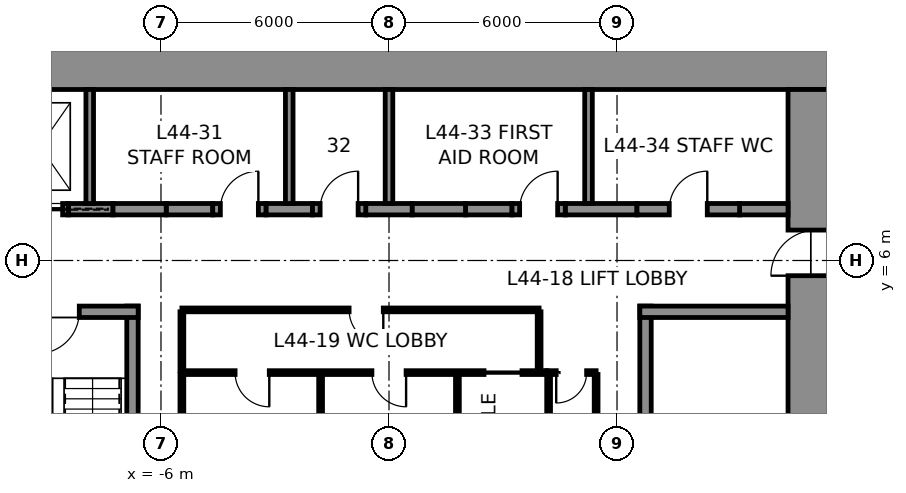
"""IFC4 building model, lengths in metres.
Left out: names, types, materials, properties, quantities, classifications, styles, units other than length and angle.
Written with IfcOpenShell. Run it as: python <this file> out.ifc"""

import sys

from ifc_helpers import new_model, si_unit, direction, frame, frame_2d, origin, place, context, subcontext, project, spatial, rectangle, extrude, element, fill, save


model = new_model("IFC4")
c1 = context("Model", 3, precision=1e-05, world=origin(), true_north=direction((0.0, 1.0)))
c2 = subcontext(c1, "Body", "Model", "MODEL_VIEW")
j1 = project(units=[si_unit("LENGTHUNIT", "METRE"), si_unit("PLANEANGLEUNIT", "RADIAN")], contexts=[c1])
p1 = place(None, origin())
s1 = spatial("IfcSite", under=j1, at=p1, CompositionType="ELEMENT")
p2 = place(p1, origin())
s2 = spatial("IfcBuilding", under=s1, at=p2, CompositionType="ELEMENT")
p3 = place(p2, frame((0.0, 0.0, 205.8)))
s3 = spatial("IfcBuildingStorey", under=s2, at=p3, CompositionType="ELEMENT", Elevation=205.8)
p4 = place(p3, frame((-12.0, 11.25, 0.0), z_axis=(0.0, 0.0, 1.0), x_axis=(1.0, 0.0, 0.0)))
e1 = element("IfcWall", 1, at=p4, inside=s3, PredefinedType="SHEAR", context=c2, shape_type="SweptSolid", body=[
    extrude(rectangle(XDim=24.0, YDim=1.5, at=frame_2d((12.0, 0.0))), origin(), (0.0, 0.0, 1.0), 4.0),
])
p5 = place(p3, frame((11.25, 10.5, 0.0), z_axis=(0.0, 0.0, 1.0), x_axis=(0.0, -1.0, 0.0)))
e2 = element("IfcWall", 2, at=p5, inside=s3, PredefinedType="SHEAR", context=c2, shape_type="SweptSolid", body=[
    extrude(rectangle(XDim=21.0, YDim=1.5, at=frame_2d((10.5, 0.0))), origin(), (0.0, 0.0, 1.0), 4.0),
])
p6 = place(p5, frame((3.7, 0.0, 0.0)))
e3 = element("IfcOpeningElement", 3, at=p6, cuts=e2, PredefinedType="OPENING", context=c2, shape_type="SweptSolid", body=[
    extrude(rectangle(XDim=1.2, YDim=2.3, at=frame_2d((0.6, 1.15))), frame((0.0, 0.76, 0.0), z_axis=(0.0, -1.0, 0.0), x_axis=(1.0, 0.0, 0.0)), (0.0, 0.0, 1.0), 1.52),
])
p7 = place(p5, frame((16.1, 0.0, 0.0)))
e4 = element("IfcOpeningElement", 4, at=p7, cuts=e2, PredefinedType="OPENING", context=c2, shape_type="SweptSolid", body=[
    extrude(rectangle(XDim=1.2, YDim=2.3, at=frame_2d((0.6, 1.15))), frame((0.0, 0.76, 0.0), z_axis=(0.0, -1.0, 0.0), x_axis=(1.0, 0.0, 0.0)), (0.0, 0.0, 1.0), 1.52),
])
p8 = place(p3, frame((-8.438, 7.35, 0.0), z_axis=(0.0, 0.0, 1.0), x_axis=(1.0, 0.0, 0.0)))
e5 = element("IfcWall", 5, at=p8, inside=s3, PredefinedType="SHEAR", context=c2, shape_type="SweptSolid", body=[
    extrude(rectangle(XDim=1.175, YDim=0.3, at=frame_2d((0.587, 0.0))), origin(), (0.0, 0.0, 1.0), 4.0),
])
for number, where, z_axis, x_axis in (
    (6, (-5.863, 7.35, 0.0), (0.0, 0.0, 1.0), (1.0, 0.0, 0.0)),
    (7, (-3.238, 7.35, 0.0), (0.0, 0.0, 1.0), (1.0, 0.0, 0.0)),
    (8, (-0.613, 7.35, 0.0), (0.0, 0.0, 1.0), (1.0, 0.0, 0.0)),
    (9, (2.012, 7.35, 0.0), (0.0, 0.0, 1.0), (1.0, 0.0, 0.0)),
):
    element("IfcWall", number, at=place(p3, frame(where, z_axis=z_axis, x_axis=x_axis)), inside=s3, PredefinedType="SHEAR", context=c2, shape_type="SweptSolid", body=[
        extrude(rectangle(XDim=1.225, YDim=0.3, at=frame_2d((0.613, 0.0))), origin(), (0.0, 0.0, 1.0), 4.0),
    ])
p9 = place(p3, frame((4.637, 7.35, 0.0), z_axis=(0.0, 0.0, 1.0), x_axis=(1.0, 0.0, 0.0)))
e10 = element("IfcWall", 10, at=p9, inside=s3, PredefinedType="SHEAR", context=c2, shape_type="SweptSolid", body=[
    extrude(rectangle(XDim=1.887, YDim=0.3, at=frame_2d((0.944, 0.0))), origin(), (0.0, 0.0, 1.0), 4.0),
])
p10 = place(p3, frame((9.225, 7.35, 0.0), z_axis=(0.0, 0.0, 1.0), x_axis=(1.0, 0.0, 0.0)))
e11 = element("IfcWall", 11, at=p10, inside=s3, PredefinedType="SHEAR", context=c2, shape_type="SweptSolid", body=[
    extrude(rectangle(XDim=1.275, YDim=0.3, at=frame_2d((0.637, 0.0))), origin(), (0.0, 0.0, 1.0), 4.0),
])
p11 = place(p3, frame((-9.938, 7.35, 0.0), z_axis=(0.0, 0.0, 1.0), x_axis=(1.0, 0.0, 0.0)))
e12 = element("IfcWall", 12, at=p11, inside=s3, PredefinedType="PARTITIONING", context=c2, shape_type="SweptSolid", body=[
    extrude(rectangle(XDim=1.5, YDim=0.3, at=frame_2d((0.75, 0.0))), origin(), (0.0, 0.0, 1.0), 4.0),
])
p12 = place(p11, frame((0.15, 0.0, 0.0)))
e13 = element("IfcOpeningElement", 13, at=p12, cuts=e12, PredefinedType="OPENING", context=c2, shape_type="SweptSolid", body=[
    extrude(rectangle(XDim=1.2, YDim=2.3, at=frame_2d((0.6, 1.15))), frame((0.0, 0.16, 0.0), z_axis=(0.0, -1.0, 0.0), x_axis=(1.0, 0.0, 0.0)), (0.0, 0.0, 1.0), 0.32),
])
p13 = place(p3, frame((-7.262, 7.35, 0.0), z_axis=(0.0, 0.0, 1.0), x_axis=(1.0, 0.0, 0.0)))
e14 = element("IfcWall", 14, at=p13, inside=s3, PredefinedType="PARTITIONING", context=c2, shape_type="SweptSolid", body=[
    extrude(rectangle(XDim=1.4, YDim=0.3, at=frame_2d((0.7, 0.0))), origin(), (0.0, 0.0, 1.0), 4.0),
])
p14 = place(p3, frame((-4.637, 7.35, 0.0), z_axis=(0.0, 0.0, 1.0), x_axis=(1.0, 0.0, 0.0)))
e15 = element("IfcWall", 15, at=p14, inside=s3, PredefinedType="PARTITIONING", context=c2, shape_type="SweptSolid", body=[
    extrude(rectangle(XDim=1.4, YDim=0.3, at=frame_2d((0.7, 0.0))), origin(), (0.0, 0.0, 1.0), 4.0),
])
p15 = place(p14, frame((0.2, 0.0, 0.0)))
e16 = element("IfcOpeningElement", 16, at=p15, cuts=e15, PredefinedType="OPENING", context=c2, shape_type="SweptSolid", body=[
    extrude(rectangle(XDim=1.0, YDim=2.3, at=frame_2d((0.5, 1.15))), frame((0.0, 0.16, 0.0), z_axis=(0.0, -1.0, 0.0), x_axis=(1.0, 0.0, 0.0)), (0.0, 0.0, 1.0), 0.32),
])
p16 = place(p3, frame((-2.012, 7.35, 0.0), z_axis=(0.0, 0.0, 1.0), x_axis=(1.0, 0.0, 0.0)))
e17 = element("IfcWall", 17, at=p16, inside=s3, PredefinedType="PARTITIONING", context=c2, shape_type="SweptSolid", body=[
    extrude(rectangle(XDim=1.4, YDim=0.3, at=frame_2d((0.7, 0.0))), origin(), (0.0, 0.0, 1.0), 4.0),
])
p17 = place(p16, frame((0.2, 0.0, 0.0)))
e18 = element("IfcOpeningElement", 18, at=p17, cuts=e17, PredefinedType="OPENING", context=c2, shape_type="SweptSolid", body=[
    extrude(rectangle(XDim=1.0, YDim=2.3, at=frame_2d((0.5, 1.15))), frame((0.0, 0.16, 0.0), z_axis=(0.0, -1.0, 0.0), x_axis=(1.0, 0.0, 0.0)), (0.0, 0.0, 1.0), 0.32),
])
p18 = place(p3, frame((0.613, 7.35, 0.0), z_axis=(0.0, 0.0, 1.0), x_axis=(1.0, 0.0, 0.0)))
e19 = element("IfcWall", 19, at=p18, inside=s3, PredefinedType="PARTITIONING", context=c2, shape_type="SweptSolid", body=[
    extrude(rectangle(XDim=1.4, YDim=0.3, at=frame_2d((0.7, 0.0))), origin(), (0.0, 0.0, 1.0), 4.0),
])
p19 = place(p3, frame((3.238, 7.35, 0.0), z_axis=(0.0, 0.0, 1.0), x_axis=(1.0, 0.0, 0.0)))
e20 = element("IfcWall", 20, at=p19, inside=s3, PredefinedType="PARTITIONING", context=c2, shape_type="SweptSolid", body=[
    extrude(rectangle(XDim=1.4, YDim=0.3, at=frame_2d((0.7, 0.0))), origin(), (0.0, 0.0, 1.0), 4.0),
])
p20 = place(p19, frame((0.2, 0.0, 0.0)))
e21 = element("IfcOpeningElement", 21, at=p20, cuts=e20, PredefinedType="OPENING", context=c2, shape_type="SweptSolid", body=[
    extrude(rectangle(XDim=1.0, YDim=2.3, at=frame_2d((0.5, 1.15))), frame((0.0, 0.16, 0.0), z_axis=(0.0, -1.0, 0.0), x_axis=(1.0, 0.0, 0.0)), (0.0, 0.0, 1.0), 0.32),
])
p21 = place(p3, frame((6.525, 7.35, 0.0), z_axis=(0.0, 0.0, 1.0), x_axis=(1.0, 0.0, 0.0)))
e22 = element("IfcWall", 22, at=p21, inside=s3, PredefinedType="PARTITIONING", context=c2, shape_type="SweptSolid", body=[
    extrude(rectangle(XDim=2.7, YDim=0.3, at=frame_2d((1.35, 0.0))), origin(), (0.0, 0.0, 1.0), 4.0),
])
p22 = place(p21, frame((0.85, 0.0, 0.0)))
e23 = element("IfcOpeningElement", 23, at=p22, cuts=e22, PredefinedType="OPENING", context=c2, shape_type="SweptSolid", body=[
    extrude(rectangle(XDim=1.0, YDim=2.3, at=frame_2d((0.5, 1.15))), frame((0.0, 0.16, 0.0), z_axis=(0.0, -1.0, 0.0), x_axis=(1.0, 0.0, 0.0)), (0.0, 0.0, 1.0), 0.32),
])
for number, where, z_axis, x_axis in (
    (24, (-7.875, 7.5, 0.0), (0.0, 0.0, 1.0), (0.0, 1.0, 0.0)),
    (25, (-2.625, 7.5, 0.0), (0.0, 0.0, 1.0), (0.0, 1.0, 0.0)),
    (26, (0.0, 7.5, 0.0), (0.0, 0.0, 1.0), (0.0, 1.0, 0.0)),
    (27, (5.25, 7.5, 0.0), (0.0, 0.0, 1.0), (0.0, 1.0, 0.0)),
):
    element("IfcWall", number, at=place(p3, frame(where, z_axis=z_axis, x_axis=x_axis)), inside=s3, PredefinedType="PARTITIONING", context=c2, shape_type="SweptSolid", body=[
        extrude(rectangle(XDim=3.0, YDim=0.2, at=frame_2d((1.5, 0.0))), origin(), (0.0, 0.0, 1.0), 4.0),
    ])
p23 = place(p3, frame((-6.75, -4.8, 0.0), z_axis=(0.0, 0.0, 1.0), x_axis=(0.0, 1.0, 0.0)))
e28 = element("IfcWall", 28, at=p23, inside=s3, PredefinedType="SOLIDWALL", context=c2, shape_type="SweptSolid", body=[
    extrude(rectangle(XDim=9.6, YDim=0.3, at=frame_2d((4.8, 0.0))), origin(), (0.0, 0.0, 1.0), 3.75),
])
p24 = place(p3, frame((-10.5, 4.65, 0.0), z_axis=(0.0, 0.0, 1.0), x_axis=(1.0, 0.0, 0.0)))
e29 = element("IfcWall", 29, at=p24, inside=s3, PredefinedType="SOLIDWALL", context=c2, shape_type="SweptSolid", body=[
    extrude(rectangle(XDim=3.9, YDim=0.3, at=frame_2d((1.95, 0.0))), origin(), (0.0, 0.0, 1.0), 3.75),
])
p25 = place(p24, frame((1.25, 0.0, 0.0)))
e30 = element("IfcOpeningElement", 30, at=p25, cuts=e29, PredefinedType="OPENING", context=c2, shape_type="SweptSolid", body=[
    extrude(rectangle(XDim=1.1, YDim=2.3, at=frame_2d((0.55, 1.15))), frame((0.0, 0.16, 0.0), z_axis=(0.0, -1.0, 0.0), x_axis=(1.0, 0.0, 0.0)), (0.0, 0.0, 1.0), 0.32),
])
p26 = place(p3, frame((6.75, -4.8, 0.0), z_axis=(0.0, 0.0, 1.0), x_axis=(0.0, 1.0, 0.0)))
e31 = element("IfcWall", 31, at=p26, inside=s3, PredefinedType="SOLIDWALL", context=c2, shape_type="SweptSolid", body=[
    extrude(rectangle(XDim=9.6, YDim=0.3, at=frame_2d((4.8, 0.0))), origin(), (0.0, 0.0, 1.0), 3.75),
])
p27 = place(p3, frame((6.6, 4.65, 0.0), z_axis=(0.0, 0.0, 1.0), x_axis=(1.0, 0.0, 0.0)))
e32 = element("IfcWall", 32, at=p27, inside=s3, PredefinedType="SOLIDWALL", context=c2, shape_type="SweptSolid", body=[
    extrude(rectangle(XDim=3.9, YDim=0.3, at=frame_2d((1.95, 0.0))), origin(), (0.0, 0.0, 1.0), 3.75),
])
p28 = place(p3, frame((-5.45, 3.05, 0.0), z_axis=(0.0, 0.0, 1.0), x_axis=(1.0, 0.0, 0.0)))
e33 = element("IfcWall", 33, at=p28, inside=s3, PredefinedType="PARTITIONING", context=c2, shape_type="SweptSolid", body=[
    extrude(rectangle(XDim=9.6, YDim=0.1, at=frame_2d((4.8, 0.0))), origin(), (0.0, 0.0, 1.0), 3.75),
])
p29 = place(p28, frame((1.4, 0.0, 0.0)))
e34 = element("IfcOpeningElement", 34, at=p29, cuts=e33, PredefinedType="OPENING", context=c2, shape_type="SweptSolid", body=[
    extrude(rectangle(XDim=0.9, YDim=2.3, at=frame_2d((0.45, 1.15))), frame((0.0, 0.06, 0.0), z_axis=(0.0, -1.0, 0.0), x_axis=(1.0, 0.0, 0.0)), (0.0, 0.0, 1.0), 0.12),
])
p30 = place(p28, frame((5.0, 0.0, 0.0)))
e35 = element("IfcOpeningElement", 35, at=p30, cuts=e33, PredefinedType="OPENING", context=c2, shape_type="SweptSolid", body=[
    extrude(rectangle(XDim=0.9, YDim=2.3, at=frame_2d((0.45, 1.15))), frame((0.0, 0.06, 0.0), z_axis=(0.0, -1.0, 0.0), x_axis=(1.0, 0.0, 0.0)), (0.0, 0.0, 1.0), 0.12),
])
p31 = place(p28, frame((7.95, 0.0, 0.0)))
e36 = element("IfcOpeningElement", 36, at=p31, cuts=e33, PredefinedType="OPENING", context=c2, shape_type="SweptSolid", body=[
    extrude(rectangle(XDim=1.0, YDim=2.3, at=frame_2d((0.5, 1.15))), frame((0.0, 0.06, 0.0), z_axis=(0.0, -1.0, 0.0), x_axis=(1.0, 0.0, 0.0)), (0.0, 0.0, 1.0), 0.12),
])
p32 = place(p3, frame((4.15, 3.05, 0.0), z_axis=(0.0, 0.0, 1.0), x_axis=(1.0, 0.0, 0.0)))
e37 = element("IfcWall", 37, at=p32, inside=s3, PredefinedType="PARTITIONING", context=c2, shape_type="SweptSolid", body=[
    extrude(rectangle(XDim=1.3, YDim=0.1, at=frame_2d((0.65, 0.0))), origin(), (0.0, 0.0, 1.0), 3.75),
])
p33 = place(p32, frame((0.25, 0.0, 0.0)))
e38 = element("IfcOpeningElement", 38, at=p33, cuts=e37, PredefinedType="OPENING", context=c2, shape_type="SweptSolid", body=[
    extrude(rectangle(XDim=0.8, YDim=2.3, at=frame_2d((0.4, 1.15))), frame((0.0, 0.06, 0.0), z_axis=(0.0, -1.0, 0.0), x_axis=(1.0, 0.0, 0.0)), (0.0, 0.0, 1.0), 0.12),
])
for number, where, z_axis, x_axis in (
    (39, (5.45, 3.0, 0.0), (0.0, 0.0, 1.0), (0.0, -1.0, 0.0)),
    (40, (-5.45, -3.0, 0.0), (0.0, 0.0, 1.0), (0.0, 1.0, 0.0)),
    (41, (-1.8, -3.0, 0.0), (0.0, 0.0, 1.0), (0.0, 1.0, 0.0)),
    (42, (1.8, -3.0, 0.0), (0.0, 0.0, 1.0), (0.0, 1.0, 0.0)),
    (43, (4.2, -3.0, 0.0), (0.0, 0.0, 1.0), (0.0, 1.0, 0.0)),
):
    element("IfcWall", number, at=place(p3, frame(where, z_axis=z_axis, x_axis=x_axis)), inside=s3, PredefinedType="PARTITIONING", context=c2, shape_type="SweptSolid", body=[
        extrude(rectangle(XDim=6.0, YDim=0.1, at=frame_2d((3.0, 0.0))), origin(), (0.0, 0.0, 1.0), 3.75),
    ])
p34 = place(p3, frame((-5.45, 4.7, 0.0), z_axis=(0.0, 0.0, 1.0), x_axis=(1.0, 0.0, 0.0)))
e44 = element("IfcWall", 44, at=p34, inside=s3, PredefinedType="PARTITIONING", context=c2, shape_type="SweptSolid", body=[
    extrude(rectangle(XDim=9.4, YDim=0.1, at=frame_2d((4.7, 0.0))), origin(), (0.0, 0.0, 1.0), 3.75),
])
p35 = place(p34, frame((4.4, 0.0, 0.0)))
e45 = element("IfcOpeningElement", 45, at=p35, cuts=e44, PredefinedType="OPENING", context=c2, shape_type="SweptSolid", body=[
    extrude(rectangle(XDim=0.9, YDim=2.3, at=frame_2d((0.45, 1.15))), frame((0.0, 0.06, 0.0), z_axis=(0.0, -1.0, 0.0), x_axis=(1.0, 0.0, 0.0)), (0.0, 0.0, 1.0), 0.12),
])
for number, where, z_axis, x_axis in (
    (46, (-5.45, 3.1, 0.0), (0.0, 0.0, 1.0), (0.0, 1.0, 0.0)),
    (47, (3.95, 3.1, 0.0), (0.0, 0.0, 1.0), (0.0, 1.0, 0.0)),
):
    element("IfcWall", number, at=place(p3, frame(where, z_axis=z_axis, x_axis=x_axis)), inside=s3, PredefinedType="PARTITIONING", context=c2, shape_type="SweptSolid", body=[
        extrude(rectangle(XDim=1.55, YDim=0.1, at=frame_2d((0.775, 0.0))), origin(), (0.0, 0.0, 1.0), 3.75),
    ])
p36 = place(p25, frame((1.1, 0.0, 0.0), z_axis=(0.0, 0.0, 1.0), x_axis=(-1.0, 0.0, 0.0)))
e48 = element("IfcDoor", 48, at=p36, inside=s3, OperationType="SINGLE_SWING_RIGHT", PredefinedType="DOOR", context=c2, shape_type="SweptSolid", body=[
    extrude(rectangle(XDim=1.1, YDim=2.3, at=frame_2d((0.55, 1.15))), frame((0.0, 0.025, 0.0), z_axis=(0.0, -1.0, 0.0), x_axis=(1.0, 0.0, 0.0)), (0.0, 0.0, 1.0), 0.05),
])
fill(e30, e48)
p37 = place(p29, frame((0.9, 0.0, 0.0), z_axis=(0.0, 0.0, 1.0), x_axis=(-1.0, 0.0, 0.0)))
e49 = element("IfcDoor", 49, at=p37, inside=s3, OperationType="SINGLE_SWING_LEFT", PredefinedType="DOOR", context=c2, shape_type="SweptSolid", body=[
    extrude(rectangle(XDim=0.9, YDim=2.3, at=frame_2d((0.45, 1.15))), frame((0.0, 0.025, 0.0), z_axis=(0.0, -1.0, 0.0), x_axis=(1.0, 0.0, 0.0)), (0.0, 0.0, 1.0), 0.05),
])
fill(e34, e49)
p38 = place(p30, frame((0.9, 0.0, 0.0), z_axis=(0.0, 0.0, 1.0), x_axis=(-1.0, 0.0, 0.0)))
e50 = element("IfcDoor", 50, at=p38, inside=s3, OperationType="SINGLE_SWING_LEFT", PredefinedType="DOOR", context=c2, shape_type="SweptSolid", body=[
    extrude(rectangle(XDim=0.9, YDim=2.3, at=frame_2d((0.45, 1.15))), frame((0.0, 0.025, 0.0), z_axis=(0.0, -1.0, 0.0), x_axis=(1.0, 0.0, 0.0)), (0.0, 0.0, 1.0), 0.05),
])
fill(e35, e50)
p39 = place(p31, frame((1.0, 0.0, 0.0), z_axis=(0.0, 0.0, 1.0), x_axis=(-1.0, 0.0, 0.0)))
e51 = element("IfcDoor", 51, at=p39, inside=s3, OperationType="SLIDING_TO_LEFT", PredefinedType="DOOR", context=c2, shape_type="SweptSolid", body=[
    extrude(rectangle(XDim=1.0, YDim=2.3, at=frame_2d((0.5, 1.15))), frame((0.0, 0.025, 0.0), z_axis=(0.0, -1.0, 0.0), x_axis=(1.0, 0.0, 0.0)), (0.0, 0.0, 1.0), 0.05),
])
fill(e36, e51)
p40 = place(p33, frame((0.8, 0.0, 0.0), z_axis=(0.0, 0.0, 1.0), x_axis=(-1.0, 0.0, 0.0)))
e52 = element("IfcDoor", 52, at=p40, inside=s3, OperationType="SINGLE_SWING_RIGHT", PredefinedType="DOOR", context=c2, shape_type="SweptSolid", body=[
    extrude(rectangle(XDim=0.8, YDim=2.3, at=frame_2d((0.4, 1.15))), frame((0.0, 0.025, 0.0), z_axis=(0.0, -1.0, 0.0), x_axis=(1.0, 0.0, 0.0)), (0.0, 0.0, 1.0), 0.05),
])
fill(e38, e52)
p41 = place(p35, frame((0.9, 0.0, 0.0), z_axis=(0.0, 0.0, 1.0), x_axis=(-1.0, 0.0, 0.0)))
e53 = element("IfcDoor", 53, at=p41, inside=s3, OperationType="SINGLE_SWING_LEFT", PredefinedType="DOOR", context=c2, shape_type="SweptSolid", body=[
    extrude(rectangle(XDim=0.9, YDim=2.3, at=frame_2d((0.45, 1.15))), frame((0.0, 0.025, 0.0), z_axis=(0.0, -1.0, 0.0), x_axis=(1.0, 0.0, 0.0)), (0.0, 0.0, 1.0), 0.05),
])
fill(e45, e53)
p42 = place(p15, origin())
e54 = element("IfcDoor", 54, at=p42, inside=s3, OperationType="SINGLE_SWING_RIGHT", PredefinedType="DOOR", context=c2, shape_type="SweptSolid", body=[
    extrude(rectangle(XDim=1.0, YDim=2.3, at=frame_2d((0.5, 1.15))), frame((0.0, 0.025, 0.0), z_axis=(0.0, -1.0, 0.0), x_axis=(1.0, 0.0, 0.0)), (0.0, 0.0, 1.0), 0.05),
])
fill(e16, e54)
p43 = place(p17, origin())
e55 = element("IfcDoor", 55, at=p43, inside=s3, OperationType="SINGLE_SWING_RIGHT", PredefinedType="DOOR", context=c2, shape_type="SweptSolid", body=[
    extrude(rectangle(XDim=1.0, YDim=2.3, at=frame_2d((0.5, 1.15))), frame((0.0, 0.025, 0.0), z_axis=(0.0, -1.0, 0.0), x_axis=(1.0, 0.0, 0.0)), (0.0, 0.0, 1.0), 0.05),
])
fill(e18, e55)
p44 = place(p20, origin())
e56 = element("IfcDoor", 56, at=p44, inside=s3, OperationType="SINGLE_SWING_RIGHT", PredefinedType="DOOR", context=c2, shape_type="SweptSolid", body=[
    extrude(rectangle(XDim=1.0, YDim=2.3, at=frame_2d((0.5, 1.15))), frame((0.0, 0.025, 0.0), z_axis=(0.0, -1.0, 0.0), x_axis=(1.0, 0.0, 0.0)), (0.0, 0.0, 1.0), 0.05),
])
fill(e21, e56)
p45 = place(p22, origin())
e57 = element("IfcDoor", 57, at=p45, inside=s3, OperationType="SINGLE_SWING_RIGHT", PredefinedType="DOOR", context=c2, shape_type="SweptSolid", body=[
    extrude(rectangle(XDim=1.0, YDim=2.3, at=frame_2d((0.5, 1.15))), frame((0.0, 0.025, 0.0), z_axis=(0.0, -1.0, 0.0), x_axis=(1.0, 0.0, 0.0)), (0.0, 0.0, 1.0), 0.05),
])
fill(e23, e57)
p46 = place(p6, frame((1.2, 0.0, 0.0), z_axis=(0.0, 0.0, 1.0), x_axis=(-1.0, 0.0, 0.0)))
e58 = element("IfcDoor", 58, at=p46, inside=s3, OperationType="SINGLE_SWING_LEFT", PredefinedType="DOOR", context=c2, shape_type="SweptSolid", body=[
    extrude(rectangle(XDim=1.2, YDim=2.3, at=frame_2d((0.6, 1.15))), frame((0.0, 0.025, 0.0), z_axis=(0.0, -1.0, 0.0), x_axis=(1.0, 0.0, 0.0)), (0.0, 0.0, 1.0), 0.05),
])
fill(e3, e58)
p47 = place(p12, frame((1.2, 0.0, 0.0), z_axis=(0.0, 0.0, 1.0), x_axis=(-1.0, 0.0, 0.0)))
e59 = element("IfcDoor", 59, at=p47, inside=s3, OperationType="SLIDING_TO_LEFT", PredefinedType="DOOR", context=c2, shape_type="SweptSolid", body=[
    extrude(rectangle(XDim=1.2, YDim=2.3, at=frame_2d((0.6, 1.15))), frame((0.0, 0.025, 0.0), z_axis=(0.0, -1.0, 0.0), x_axis=(1.0, 0.0, 0.0)), (0.0, 0.0, 1.0), 0.05),
])
fill(e13, e59)
save(model, sys.argv[1])
